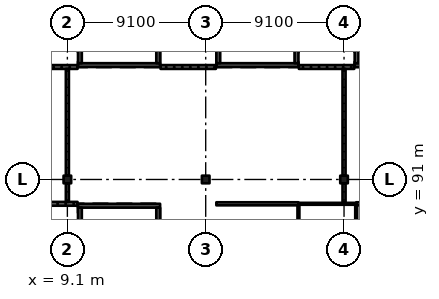
"""IFC4 building model, lengths in metres.
Left out: names, types, materials, properties, quantities, classifications, styles, units other than length and angle.
Written with IfcOpenShell. Run it as: python <this file> out.ifc"""

import sys

from ifc_helpers import new_model, si_unit, direction, frame, frame_2d, origin, origin_2d, place, context, subcontext, project, spatial, rectangle, extrude, element, fill, save


model = new_model("IFC4")
c1 = context("Model", 3, precision=1e-05, world=origin(), true_north=direction((0.0, 1.0)))
c2 = subcontext(c1, "Body", "Model", "MODEL_VIEW")
j1 = project(units=[si_unit("LENGTHUNIT", "METRE"), si_unit("PLANEANGLEUNIT", "RADIAN")], contexts=[c1])
p1 = place(None, origin())
s1 = spatial("IfcSite", under=j1, at=p1, CompositionType="ELEMENT")
p2 = place(p1, origin())
s2 = spatial("IfcBuilding", under=s1, at=p2, CompositionType="ELEMENT")
p3 = place(p2, frame((0.0, 0.0, 24.57)))
s3 = spatial("IfcBuildingStorey", under=s2, at=p3, CompositionType="ELEMENT", Elevation=24.57)
for number, where, z_axis, x_axis in (
    (1, (9.1, 91.0, 0.0), (0.0, 0.0, 1.0), (1.0, 0.0, 0.0)),
    (2, (18.2, 91.0, 0.0), (0.0, 0.0, 1.0), (1.0, 0.0, 0.0)),
    (3, (27.3, 91.0, 0.0), (0.0, 0.0, 1.0), (1.0, 0.0, 0.0)),
):
    element("IfcColumn", number, at=place(p3, frame(where, z_axis=z_axis, x_axis=x_axis)), inside=s3, PredefinedType="COLUMN", context=c2, shape_type="SweptSolid", body=[
        extrude(rectangle(XDim=0.5, YDim=0.5, at=origin_2d()), origin(), (0.0, 0.0, 1.0), 4.55),
    ])
p4 = place(p3, frame((15.2, 98.525, 0.0), z_axis=(0.0, 0.0, 1.0), x_axis=(-1.0, 0.0, 0.0)))
e4 = element("IfcWall", 4, at=p4, inside=s3, PredefinedType="SHEAR", context=c2, shape_type="SweptSolid", body=[
    extrude(rectangle(XDim=5.4, YDim=0.25, at=frame_2d((2.7, 0.0))), origin(), (0.0, 0.0, 1.0), 4.55),
])
p5 = place(p4, frame((1.5, 0.0, 0.0)))
e5 = element("IfcOpeningElement", 5, at=p5, cuts=e4, PredefinedType="OPENING", context=c2, shape_type="SweptSolid", body=[
    extrude(rectangle(XDim=2.4, YDim=2.1, at=frame_2d((1.2, 1.05))), frame((0.0, 0.135, 0.0), z_axis=(0.0, -1.0, 0.0), x_axis=(1.0, 0.0, 0.0)), (0.0, 0.0, 1.0), 0.27),
])
for number, where, z_axis, x_axis in (
    (6, (9.925, 108.25, 0.0), (0.0, 0.0, 1.0), (0.0, -1.0, 0.0)),
    (7, (15.075, 108.25, 0.0), (0.0, 0.0, 1.0), (0.0, -1.0, 0.0)),
):
    element("IfcWall", number, at=place(p3, frame(where, z_axis=z_axis, x_axis=x_axis)), inside=s3, PredefinedType="SHEAR", context=c2, shape_type="SweptSolid", body=[
        extrude(rectangle(XDim=9.6, YDim=0.25, at=frame_2d((4.8, 0.0))), origin(), (0.0, 0.0, 1.0), 4.55),
    ])
p6 = place(p3, frame((24.3, 98.525, 0.0), z_axis=(0.0, 0.0, 1.0), x_axis=(-1.0, 0.0, 0.0)))
e8 = element("IfcWall", 8, at=p6, inside=s3, PredefinedType="SHEAR", context=c2, shape_type="SweptSolid", body=[
    extrude(rectangle(XDim=5.4, YDim=0.25, at=frame_2d((2.7, 0.0))), origin(), (0.0, 0.0, 1.0), 4.55),
])
p7 = place(p6, frame((1.5, 0.0, 0.0)))
e9 = element("IfcOpeningElement", 9, at=p7, cuts=e8, PredefinedType="OPENING", context=c2, shape_type="SweptSolid", body=[
    extrude(rectangle(XDim=2.4, YDim=2.1, at=frame_2d((1.2, 1.05))), frame((0.0, 0.135, 0.0), z_axis=(0.0, -1.0, 0.0), x_axis=(1.0, 0.0, 0.0)), (0.0, 0.0, 1.0), 0.27),
])
for number, where, z_axis, x_axis in (
    (10, (19.025, 108.25, 0.0), (0.0, 0.0, 1.0), (0.0, -1.0, 0.0)),
    (11, (24.175, 108.25, 0.0), (0.0, 0.0, 1.0), (0.0, -1.0, 0.0)),
):
    element("IfcWall", number, at=place(p3, frame(where, z_axis=z_axis, x_axis=x_axis)), inside=s3, PredefinedType="SHEAR", context=c2, shape_type="SweptSolid", body=[
        extrude(rectangle(XDim=9.6, YDim=0.25, at=frame_2d((4.8, 0.0))), origin(), (0.0, 0.0, 1.0), 4.55),
    ])
p8 = place(p3, frame((33.4, 98.525, 0.0), z_axis=(0.0, 0.0, 1.0), x_axis=(-1.0, 0.0, 0.0)))
e12 = element("IfcWall", 12, at=p8, inside=s3, PredefinedType="SHEAR", context=c2, shape_type="SweptSolid", body=[
    extrude(rectangle(XDim=5.4, YDim=0.25, at=frame_2d((2.7, 0.0))), origin(), (0.0, 0.0, 1.0), 4.55),
])
p9 = place(p8, frame((1.5, 0.0, 0.0)))
e13 = element("IfcOpeningElement", 13, at=p9, cuts=e12, PredefinedType="OPENING", context=c2, shape_type="SweptSolid", body=[
    extrude(rectangle(XDim=2.4, YDim=2.1, at=frame_2d((1.2, 1.05))), frame((0.0, 0.135, 0.0), z_axis=(0.0, -1.0, 0.0), x_axis=(1.0, 0.0, 0.0)), (0.0, 0.0, 1.0), 0.27),
])
p10 = place(p3, frame((28.125, 108.25, 0.0), z_axis=(0.0, 0.0, 1.0), x_axis=(0.0, -1.0, 0.0)))
e14 = element("IfcWall", 14, at=p10, inside=s3, PredefinedType="SHEAR", context=c2, shape_type="SweptSolid", body=[
    extrude(rectangle(XDim=9.6, YDim=0.25, at=frame_2d((4.8, 0.0))), origin(), (0.0, 0.0, 1.0), 4.55),
])
p11 = place(p3, frame((15.2, 89.275, 0.0), z_axis=(0.0, 0.0, 1.0), x_axis=(-1.0, 0.0, 0.0)))
e15 = element("IfcWall", 15, at=p11, inside=s3, PredefinedType="SHEAR", context=c2, shape_type="SweptSolid", body=[
    extrude(rectangle(XDim=5.4, YDim=0.25, at=frame_2d((2.7, 0.0))), origin(), (0.0, 0.0, 1.0), 4.55),
])
p12 = place(p11, frame((1.5, 0.0, 0.0)))
e16 = element("IfcOpeningElement", 16, at=p12, cuts=e15, PredefinedType="OPENING", context=c2, shape_type="SweptSolid", body=[
    extrude(rectangle(XDim=2.4, YDim=2.1, at=frame_2d((1.2, 1.05))), frame((0.0, 0.135, 0.0), z_axis=(0.0, -1.0, 0.0), x_axis=(1.0, 0.0, 0.0)), (0.0, 0.0, 1.0), 0.27),
])
for number, where, z_axis, x_axis in (
    (17, (9.925, 89.15, 0.0), (0.0, 0.0, 1.0), (0.0, -1.0, 0.0)),
    (18, (15.075, 89.15, 0.0), (0.0, 0.0, 1.0), (0.0, -1.0, 0.0)),
):
    element("IfcWall", number, at=place(p3, frame(where, z_axis=z_axis, x_axis=x_axis)), inside=s3, PredefinedType="SHEAR", context=c2, shape_type="SweptSolid", body=[
        extrude(rectangle(XDim=9.6, YDim=0.25, at=frame_2d((4.8, 0.0))), origin(), (0.0, 0.0, 1.0), 4.55),
    ])
p13 = place(p3, frame((6.13, 98.4, 0.0), z_axis=(0.0, 0.0, 1.0), x_axis=(1.0, 0.0, 0.0)))
e19 = element("IfcWall", 19, at=p13, inside=s3, PredefinedType="SOLIDWALL", context=c2, shape_type="SweptSolid", body=[
    extrude(rectangle(XDim=3.64, YDim=0.25, at=frame_2d((1.82, 0.0))), origin(), (0.0, 0.0, 1.0), 4.35),
])
p14 = place(p13, frame((0.95, 0.0, 0.0)))
e20 = element("IfcOpeningElement", 20, at=p14, cuts=e19, PredefinedType="OPENING", context=c2, shape_type="SweptSolid", body=[
    extrude(rectangle(XDim=1.0, YDim=2.1, at=frame_2d((0.5, 1.05))), frame((0.0, 0.135, 0.0), z_axis=(0.0, -1.0, 0.0), x_axis=(1.0, 0.0, 0.0)), (0.0, 0.0, 1.0), 0.27),
])
p15 = place(p3, frame((6.13, 89.4, 0.0), z_axis=(0.0, 0.0, 1.0), x_axis=(1.0, 0.0, 0.0)))
e21 = element("IfcWall", 21, at=p15, inside=s3, PredefinedType="SOLIDWALL", context=c2, shape_type="SweptSolid", body=[
    extrude(rectangle(XDim=3.64, YDim=0.25, at=frame_2d((1.82, 0.0))), origin(), (0.0, 0.0, 1.0), 4.35),
])
p16 = place(p15, frame((1.02, 0.0, 0.0)))
e22 = element("IfcOpeningElement", 22, at=p16, cuts=e21, PredefinedType="OPENING", context=c2, shape_type="SweptSolid", body=[
    extrude(rectangle(XDim=1.0, YDim=2.1, at=frame_2d((0.5, 1.05))), frame((0.0, 0.135, 0.0), z_axis=(0.0, -1.0, 0.0), x_axis=(1.0, 0.0, 0.0)), (0.0, 0.0, 1.0), 0.27),
])
p17 = place(p3, frame((9.1, 90.75, 0.0), z_axis=(0.0, 0.0, 1.0), x_axis=(0.0, -1.0, 0.0)))
e23 = element("IfcWall", 23, at=p17, inside=s3, PredefinedType="PARTITIONING", context=c2, shape_type="SweptSolid", body=[
    extrude(rectangle(XDim=1.225, YDim=0.2, at=frame_2d((0.613, 0.0))), origin(), (0.0, 0.0, 1.0), 3.6),
])
p18 = place(p3, frame((9.1, 98.275, 0.0), z_axis=(0.0, 0.0, 1.0), x_axis=(0.0, -1.0, 0.0)))
e24 = element("IfcWall", 24, at=p18, inside=s3, PredefinedType="PARTITIONING", context=c2, shape_type="SweptSolid", body=[
    extrude(rectangle(XDim=7.025, YDim=0.2, at=frame_2d((3.512, 0.0))), origin(), (0.0, 0.0, 1.0), 3.6),
])
p19 = place(p18, frame((0.85, 0.0, 0.0)))
e25 = element("IfcOpeningElement", 25, at=p19, cuts=e24, PredefinedType="OPENING", context=c2, shape_type="SweptSolid", body=[
    extrude(rectangle(XDim=1.8, YDim=2.4, at=frame_2d((0.9, 1.2))), frame((0.0, 0.11, 0.0), z_axis=(0.0, -1.0, 0.0), x_axis=(1.0, 0.0, 0.0)), (0.0, 0.0, 1.0), 0.22),
])
p20 = place(p18, frame((4.35, 0.0, 0.0)))
e26 = element("IfcOpeningElement", 26, at=p20, cuts=e24, PredefinedType="OPENING", context=c2, shape_type="SweptSolid", body=[
    extrude(rectangle(XDim=1.8, YDim=2.4, at=frame_2d((0.9, 1.2))), frame((0.0, 0.11, 0.0), z_axis=(0.0, -1.0, 0.0), x_axis=(1.0, 0.0, 0.0)), (0.0, 0.0, 1.0), 0.22),
])
p21 = place(p3, frame((15.23, 98.4, 0.0), z_axis=(0.0, 0.0, 1.0), x_axis=(1.0, 0.0, 0.0)))
e27 = element("IfcWall", 27, at=p21, inside=s3, PredefinedType="SOLIDWALL", context=c2, shape_type="SweptSolid", body=[
    extrude(rectangle(XDim=3.64, YDim=0.25, at=frame_2d((1.82, 0.0))), origin(), (0.0, 0.0, 1.0), 4.35),
])
p22 = place(p21, frame((1.45, 0.0, 0.0)))
e28 = element("IfcOpeningElement", 28, at=p22, cuts=e27, PredefinedType="OPENING", context=c2, shape_type="SweptSolid", body=[
    extrude(rectangle(XDim=0.8, YDim=2.1, at=frame_2d((0.4, 1.05))), frame((0.0, 0.135, 0.0), z_axis=(0.0, -1.0, 0.0), x_axis=(1.0, 0.0, 0.0)), (0.0, 0.0, 1.0), 0.27),
])
p23 = place(p3, frame((24.3, 82.33, 0.0), z_axis=(0.0, 0.0, 1.0), x_axis=(0.0, 1.0, 0.0)))
e29 = element("IfcWall", 29, at=p23, inside=s3, PredefinedType="PARTITIONING", context=c2, shape_type="SweptSolid", body=[
    extrude(rectangle(XDim=6.97, YDim=0.125, at=frame_2d((3.485, 0.0))), origin(), (0.0, 0.0, 1.0), 4.35),
])
p24 = place(p3, frame((24.3, 89.4, 0.0), z_axis=(0.0, 0.0, 1.0), x_axis=(-1.0, 0.0, 0.0)))
e30 = element("IfcWall", 30, at=p24, inside=s3, PredefinedType="PARTITIONING", context=c2, shape_type="SweptSolid", body=[
    extrude(rectangle(XDim=5.4, YDim=0.2, at=frame_2d((2.7, 0.0))), origin(), (0.0, 0.0, 1.0), 4.35),
])
p25 = place(p24, frame((1.85, 0.0, 0.0)))
e31 = element("IfcOpeningElement", 31, at=p25, cuts=e30, PredefinedType="OPENING", context=c2, shape_type="SweptSolid", body=[
    extrude(rectangle(XDim=1.8, YDim=2.4, at=frame_2d((0.9, 1.2))), frame((0.0, 0.11, 0.0), z_axis=(0.0, -1.0, 0.0), x_axis=(1.0, 0.0, 0.0)), (0.0, 0.0, 1.0), 0.22),
])
p26 = place(p3, frame((24.33, 98.4, 0.0), z_axis=(0.0, 0.0, 1.0), x_axis=(1.0, 0.0, 0.0)))
e32 = element("IfcWall", 32, at=p26, inside=s3, PredefinedType="SOLIDWALL", context=c2, shape_type="SweptSolid", body=[
    extrude(rectangle(XDim=3.64, YDim=0.25, at=frame_2d((1.82, 0.0))), origin(), (0.0, 0.0, 1.0), 4.35),
])
p27 = place(p26, frame((0.95, 0.0, 0.0)))
e33 = element("IfcOpeningElement", 33, at=p27, cuts=e32, PredefinedType="OPENING", context=c2, shape_type="SweptSolid", body=[
    extrude(rectangle(XDim=1.0, YDim=2.1, at=frame_2d((0.5, 1.05))), frame((0.0, 0.135, 0.0), z_axis=(0.0, -1.0, 0.0), x_axis=(1.0, 0.0, 0.0)), (0.0, 0.0, 1.0), 0.27),
])
p28 = place(p3, frame((24.3, 89.4, 0.0), z_axis=(0.0, 0.0, 1.0), x_axis=(1.0, 0.0, 0.0)))
e34 = element("IfcWall", 34, at=p28, inside=s3, PredefinedType="PARTITIONING", context=c2, shape_type="SweptSolid", body=[
    extrude(rectangle(XDim=3.8, YDim=0.125, at=frame_2d((1.9, 0.0))), origin(), (0.0, 0.0, 1.0), 4.35),
])
p29 = place(p28, frame((1.05, 0.0, 0.0)))
e35 = element("IfcOpeningElement", 35, at=p29, cuts=e34, PredefinedType="OPENING", context=c2, shape_type="SweptSolid", body=[
    extrude(rectangle(XDim=0.9, YDim=2.1, at=frame_2d((0.45, 1.05))), frame((0.0, 0.073, 0.0), z_axis=(0.0, -1.0, 0.0), x_axis=(1.0, 0.0, 0.0)), (0.0, 0.0, 1.0), 0.145),
])
p30 = place(p3, frame((27.3, 90.75, 0.0), z_axis=(0.0, 0.0, 1.0), x_axis=(0.0, -1.0, 0.0)))
e36 = element("IfcWall", 36, at=p30, inside=s3, PredefinedType="PARTITIONING", context=c2, shape_type="SweptSolid", body=[
    extrude(rectangle(XDim=1.288, YDim=0.2, at=frame_2d((0.644, 0.0))), origin(), (0.0, 0.0, 1.0), 3.6),
])
p31 = place(p3, frame((27.3, 98.275, 0.0), z_axis=(0.0, 0.0, 1.0), x_axis=(0.0, -1.0, 0.0)))
e37 = element("IfcWall", 37, at=p31, inside=s3, PredefinedType="PARTITIONING", context=c2, shape_type="SweptSolid", body=[
    extrude(rectangle(XDim=7.025, YDim=0.2, at=frame_2d((3.512, 0.0))), origin(), (0.0, 0.0, 1.0), 3.6),
])
p32 = place(p31, frame((0.85, 0.0, 0.0)))
e38 = element("IfcOpeningElement", 38, at=p32, cuts=e37, PredefinedType="OPENING", context=c2, shape_type="SweptSolid", body=[
    extrude(rectangle(XDim=1.8, YDim=2.4, at=frame_2d((0.9, 1.2))), frame((0.0, 0.11, 0.0), z_axis=(0.0, -1.0, 0.0), x_axis=(1.0, 0.0, 0.0)), (0.0, 0.0, 1.0), 0.22),
])
p33 = place(p31, frame((4.35, 0.0, 0.0)))
e39 = element("IfcOpeningElement", 39, at=p33, cuts=e37, PredefinedType="OPENING", context=c2, shape_type="SweptSolid", body=[
    extrude(rectangle(XDim=1.8, YDim=2.4, at=frame_2d((0.9, 1.2))), frame((0.0, 0.11, 0.0), z_axis=(0.0, -1.0, 0.0), x_axis=(1.0, 0.0, 0.0)), (0.0, 0.0, 1.0), 0.22),
])
p34 = place(p3, frame((28.1, 89.3, 0.0), z_axis=(0.0, 0.0, 1.0), x_axis=(0.0, -1.0, 0.0)))
e40 = element("IfcWall", 40, at=p34, inside=s3, PredefinedType="PARTITIONING", context=c2, shape_type="SweptSolid", body=[
    extrude(rectangle(XDim=2.87, YDim=0.125, at=frame_2d((1.435, 0.0))), origin(), (0.0, 0.0, 1.0), 4.35),
])
p35 = place(p3, frame((33.4, 89.4, 0.0), z_axis=(0.0, 0.0, 1.0), x_axis=(-1.0, 0.0, 0.0)))
e41 = element("IfcWall", 41, at=p35, inside=s3, PredefinedType="PARTITIONING", context=c2, shape_type="SweptSolid", body=[
    extrude(rectangle(XDim=5.3, YDim=0.2, at=frame_2d((2.65, 0.0))), origin(), (0.0, 0.0, 1.0), 4.35),
])
p36 = place(p35, frame((1.75, 0.0, 0.0)))
e42 = element("IfcOpeningElement", 42, at=p36, cuts=e41, PredefinedType="OPENING", context=c2, shape_type="SweptSolid", body=[
    extrude(rectangle(XDim=1.8, YDim=2.4, at=frame_2d((0.9, 1.2))), frame((0.0, 0.11, 0.0), z_axis=(0.0, -1.0, 0.0), x_axis=(1.0, 0.0, 0.0)), (0.0, 0.0, 1.0), 0.22),
])
p37 = place(p16, origin())
e43 = element("IfcDoor", 43, at=p37, inside=s3, OperationType="SINGLE_SWING_RIGHT", PredefinedType="DOOR", context=c2, shape_type="SweptSolid", body=[
    extrude(rectangle(XDim=1.0, YDim=2.1, at=frame_2d((0.5, 1.05))), frame((0.0, 0.025, 0.0), z_axis=(0.0, -1.0, 0.0), x_axis=(1.0, 0.0, 0.0)), (0.0, 0.0, 1.0), 0.05),
])
fill(e22, e43)
p38 = place(p29, origin())
e44 = element("IfcDoor", 44, at=p38, inside=s3, OperationType="SINGLE_SWING_LEFT", PredefinedType="DOOR", context=c2, shape_type="SweptSolid", body=[
    extrude(rectangle(XDim=0.9, YDim=2.1, at=frame_2d((0.45, 1.05))), frame((0.0, 0.025, 0.0), z_axis=(0.0, -1.0, 0.0), x_axis=(1.0, 0.0, 0.0)), (0.0, 0.0, 1.0), 0.05),
])
fill(e35, e44)
p39 = place(p22, origin())
e45 = element("IfcDoor", 45, at=p39, inside=s3, OperationType="SINGLE_SWING_LEFT", PredefinedType="DOOR", context=c2, shape_type="SweptSolid", body=[
    extrude(rectangle(XDim=0.8, YDim=2.1, at=frame_2d((0.4, 1.05))), frame((0.0, 0.025, 0.0), z_axis=(0.0, -1.0, 0.0), x_axis=(1.0, 0.0, 0.0)), (0.0, 0.0, 1.0), 0.05),
])
fill(e28, e45)
p40 = place(p27, origin())
e46 = element("IfcDoor", 46, at=p40, inside=s3, OperationType="SINGLE_SWING_RIGHT", PredefinedType="DOOR", context=c2, shape_type="SweptSolid", body=[
    extrude(rectangle(XDim=1.0, YDim=2.1, at=frame_2d((0.5, 1.05))), frame((0.0, 0.025, 0.0), z_axis=(0.0, -1.0, 0.0), x_axis=(1.0, 0.0, 0.0)), (0.0, 0.0, 1.0), 0.05),
])
fill(e33, e46)
p41 = place(p19, origin())
e47 = element("IfcDoor", 47, at=p41, inside=s3, OperationType="DOUBLE_DOOR_SINGLE_SWING", PredefinedType="DOOR", context=c2, shape_type="SweptSolid", body=[
    extrude(rectangle(XDim=1.8, YDim=2.4, at=frame_2d((0.9, 1.2))), frame((0.0, 0.025, 0.0), z_axis=(0.0, -1.0, 0.0), x_axis=(1.0, 0.0, 0.0)), (0.0, 0.0, 1.0), 0.05),
])
fill(e25, e47)
p42 = place(p20, origin())
e48 = element("IfcDoor", 48, at=p42, inside=s3, OperationType="DOUBLE_DOOR_SINGLE_SWING", PredefinedType="DOOR", context=c2, shape_type="SweptSolid", body=[
    extrude(rectangle(XDim=1.8, YDim=2.4, at=frame_2d((0.9, 1.2))), frame((0.0, 0.025, 0.0), z_axis=(0.0, -1.0, 0.0), x_axis=(1.0, 0.0, 0.0)), (0.0, 0.0, 1.0), 0.05),
])
fill(e26, e48)
p43 = place(p32, origin())
e49 = element("IfcDoor", 49, at=p43, inside=s3, OperationType="DOUBLE_DOOR_SINGLE_SWING", PredefinedType="DOOR", context=c2, shape_type="SweptSolid", body=[
    extrude(rectangle(XDim=1.8, YDim=2.4, at=frame_2d((0.9, 1.2))), frame((0.0, 0.025, 0.0), z_axis=(0.0, -1.0, 0.0), x_axis=(1.0, 0.0, 0.0)), (0.0, 0.0, 1.0), 0.05),
])
fill(e38, e49)
p44 = place(p33, origin())
e50 = element("IfcDoor", 50, at=p44, inside=s3, OperationType="DOUBLE_DOOR_SINGLE_SWING", PredefinedType="DOOR", context=c2, shape_type="SweptSolid", body=[
    extrude(rectangle(XDim=1.8, YDim=2.4, at=frame_2d((0.9, 1.2))), frame((0.0, 0.025, 0.0), z_axis=(0.0, -1.0, 0.0), x_axis=(1.0, 0.0, 0.0)), (0.0, 0.0, 1.0), 0.05),
])
fill(e39, e50)
p45 = place(p25, origin())
e51 = element("IfcDoor", 51, at=p45, inside=s3, OperationType="DOUBLE_DOOR_SINGLE_SWING", PredefinedType="DOOR", context=c2, shape_type="SweptSolid", body=[
    extrude(rectangle(XDim=1.8, YDim=2.4, at=frame_2d((0.9, 1.2))), frame((0.0, 0.025, 0.0), z_axis=(0.0, -1.0, 0.0), x_axis=(1.0, 0.0, 0.0)), (0.0, 0.0, 1.0), 0.05),
])
fill(e31, e51)
p46 = place(p5, origin())
e52 = element("IfcDoor", 52, at=p46, inside=s3, OperationType="DOUBLE_DOOR_SINGLE_SWING", PredefinedType="DOOR", context=c2, shape_type="SweptSolid", body=[
    extrude(rectangle(XDim=2.4, YDim=2.1, at=frame_2d((1.2, 1.05))), frame((0.0, 0.025, 0.0), z_axis=(0.0, -1.0, 0.0), x_axis=(1.0, 0.0, 0.0)), (0.0, 0.0, 1.0), 0.05),
])
fill(e5, e52)
p47 = place(p7, origin())
e53 = element("IfcDoor", 53, at=p47, inside=s3, OperationType="DOUBLE_DOOR_SINGLE_SWING", PredefinedType="DOOR", context=c2, shape_type="SweptSolid", body=[
    extrude(rectangle(XDim=2.4, YDim=2.1, at=frame_2d((1.2, 1.05))), frame((0.0, 0.025, 0.0), z_axis=(0.0, -1.0, 0.0), x_axis=(1.0, 0.0, 0.0)), (0.0, 0.0, 1.0), 0.05),
])
fill(e9, e53)
p48 = place(p12, origin())
e54 = element("IfcDoor", 54, at=p48, inside=s3, OperationType="DOUBLE_DOOR_SINGLE_SWING", PredefinedType="DOOR", context=c2, shape_type="SweptSolid", body=[
    extrude(rectangle(XDim=2.4, YDim=2.1, at=frame_2d((1.2, 1.05))), frame((0.0, 0.025, 0.0), z_axis=(0.0, -1.0, 0.0), x_axis=(1.0, 0.0, 0.0)), (0.0, 0.0, 1.0), 0.05),
])
fill(e16, e54)
save(model, sys.argv[1])
